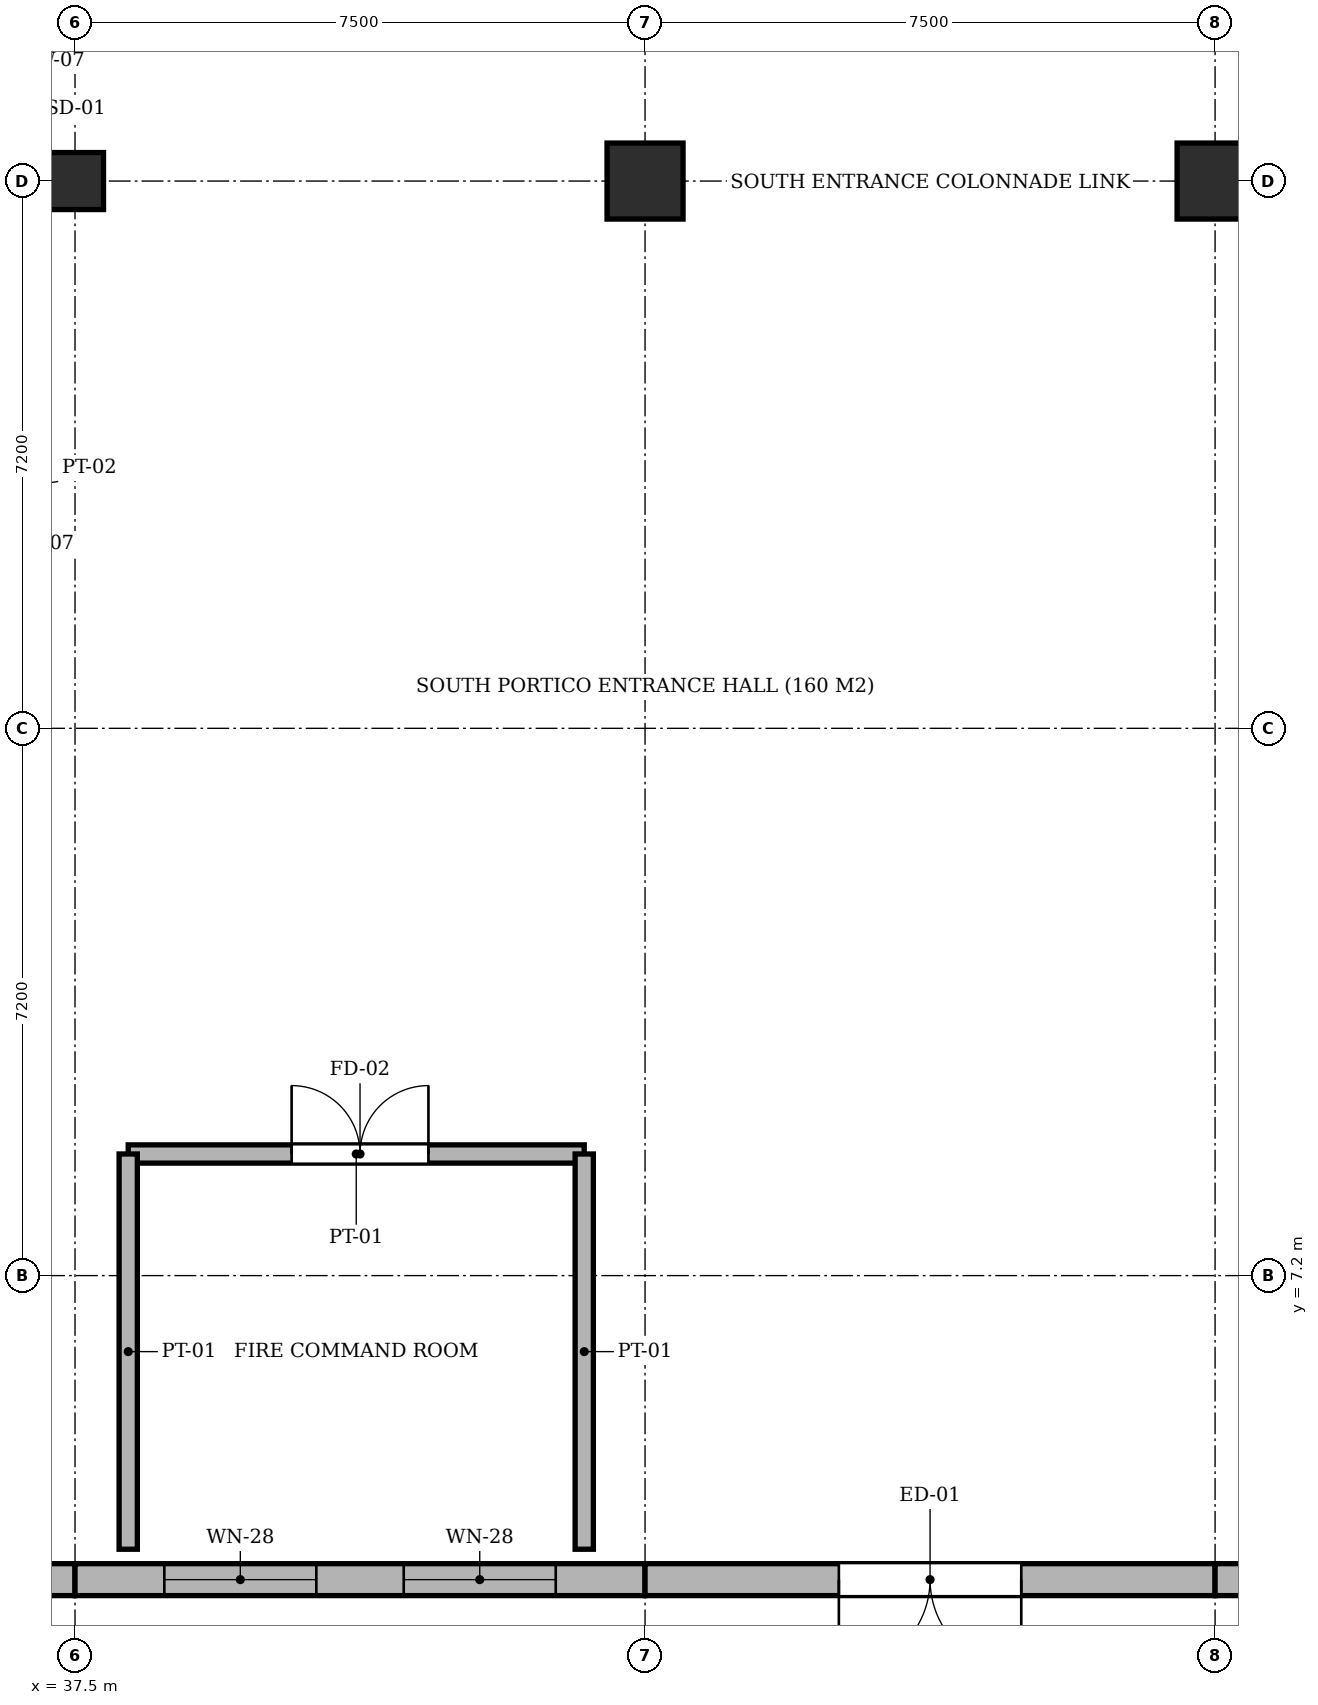
"""IFC4 building model, lengths in metres.
Left out: names, types, materials, properties, quantities, classifications, styles, units other than length and angle.
Written with IfcOpenShell. Run it as: python <this file> out.ifc"""

import sys

from ifc_helpers import new_model, si_unit, direction, frame, frame_2d, origin, origin_2d, place, context, subcontext, project, spatial, rectangle, extrude, element, fill, save


model = new_model("IFC4")
c1 = context("Model", 3, precision=1e-05, world=origin(), true_north=direction((0.0, 1.0)))
c2 = subcontext(c1, "Body", "Model", "MODEL_VIEW")
j1 = project(units=[si_unit("LENGTHUNIT", "METRE"), si_unit("PLANEANGLEUNIT", "RADIAN")], contexts=[c1])
p1 = place(None, origin())
s1 = spatial("IfcSite", under=j1, at=p1, CompositionType="ELEMENT")
p2 = place(p1, origin())
s2 = spatial("IfcBuilding", under=s1, at=p2, CompositionType="ELEMENT")
p3 = place(p2, origin())
s3 = spatial("IfcBuildingStorey", under=s2, at=p3, CompositionType="ELEMENT", Elevation=0.0)
p4 = place(p3, frame((37.5, 21.6, -0.35), z_axis=(0.0, 0.0, 1.0), x_axis=(1.0, 0.0, 0.0)))
e1 = element("IfcColumn", 1, at=p4, inside=s3, PredefinedType="COLUMN", context=c2, shape_type="SweptSolid", body=[
    extrude(rectangle(XDim=0.75, YDim=0.75, at=origin_2d()), origin(), (0.0, 0.0, 1.0), 4.65),
])
for number, where, z_axis, x_axis in (
    (2, (45.0, 21.6, -0.35), (0.0, 0.0, 1.0), (1.0, 0.0, 0.0)),
    (3, (52.5, 21.6, -0.35), (0.0, 0.0, 1.0), (1.0, 0.0, 0.0)),
):
    element("IfcColumn", number, at=place(p3, frame(where, z_axis=z_axis, x_axis=x_axis)), inside=s3, PredefinedType="COLUMN", context=c2, shape_type="SweptSolid", body=[
        extrude(rectangle(XDim=1.0, YDim=1.0, at=origin_2d()), origin(), (0.0, 0.0, 1.0), 4.65),
    ])
p5 = place(p3, frame((30.0, 3.2, 0.0), z_axis=(0.0, 0.0, 1.0), x_axis=(1.0, 0.0, 0.0)))
e4 = element("IfcWall", 4, at=p5, inside=s3, PredefinedType="SOLIDWALL", context=c2, shape_type="SweptSolid", body=[
    extrude(rectangle(XDim=7.5, YDim=0.42, at=frame_2d((3.75, 0.0))), origin(), (0.0, 0.0, 1.0), 3.82),
])
p6 = place(p5, frame((2.55, 0.0, 0.0)))
e5 = element("IfcOpeningElement", 5, at=p6, cuts=e4, PredefinedType="OPENING", context=c2, shape_type="SweptSolid", body=[
    extrude(rectangle(XDim=2.4, YDim=2.85, at=frame_2d((1.2, 1.425))), frame((0.0, 0.222, 0.0), z_axis=(0.0, -1.0, 0.0), x_axis=(1.0, 0.0, 0.0)), (0.0, 0.0, 1.0), 0.444),
])
p7 = place(p3, frame((37.5, 3.2, 0.0), z_axis=(0.0, 0.0, 1.0), x_axis=(1.0, 0.0, 0.0)))
e6 = element("IfcWall", 6, at=p7, inside=s3, PredefinedType="SOLIDWALL", context=c2, shape_type="SweptSolid", body=[
    extrude(rectangle(XDim=7.5, YDim=0.42, at=frame_2d((3.75, 0.0))), origin(), (0.0, 0.0, 1.0), 3.82),
])
p8 = place(p7, frame((1.175, 0.0, 0.92)))
e7 = element("IfcOpeningElement", 7, at=p8, cuts=e6, PredefinedType="OPENING", context=c2, shape_type="SweptSolid", body=[
    extrude(rectangle(XDim=2.0, YDim=1.89, at=frame_2d((1.0, 0.945))), frame((0.0, 0.222, 0.0), z_axis=(0.0, -1.0, 0.0), x_axis=(1.0, 0.0, 0.0)), (0.0, 0.0, 1.0), 0.444),
])
p9 = place(p7, frame((4.325, 0.0, 0.92)))
e8 = element("IfcOpeningElement", 8, at=p9, cuts=e6, PredefinedType="OPENING", context=c2, shape_type="SweptSolid", body=[
    extrude(rectangle(XDim=2.0, YDim=1.89, at=frame_2d((1.0, 0.945))), frame((0.0, 0.222, 0.0), z_axis=(0.0, -1.0, 0.0), x_axis=(1.0, 0.0, 0.0)), (0.0, 0.0, 1.0), 0.444),
])
p10 = place(p3, frame((45.0, 3.2, 0.0), z_axis=(0.0, 0.0, 1.0), x_axis=(1.0, 0.0, 0.0)))
e9 = element("IfcWall", 9, at=p10, inside=s3, PredefinedType="SOLIDWALL", context=c2, shape_type="SweptSolid", body=[
    extrude(rectangle(XDim=7.5, YDim=0.42, at=frame_2d((3.75, 0.0))), origin(), (0.0, 0.0, 1.0), 3.82),
])
p11 = place(p10, frame((2.55, 0.0, 0.0)))
e10 = element("IfcOpeningElement", 10, at=p11, cuts=e9, PredefinedType="OPENING", context=c2, shape_type="SweptSolid", body=[
    extrude(rectangle(XDim=2.4, YDim=2.85, at=frame_2d((1.2, 1.425))), frame((0.0, 0.222, 0.0), z_axis=(0.0, -1.0, 0.0), x_axis=(1.0, 0.0, 0.0)), (0.0, 0.0, 1.0), 0.444),
])
p12 = place(p3, frame((52.5, 3.2, 0.0), z_axis=(0.0, 0.0, 1.0), x_axis=(1.0, 0.0, 0.0)))
e11 = element("IfcWall", 11, at=p12, inside=s3, PredefinedType="SOLIDWALL", context=c2, shape_type="SweptSolid", body=[
    extrude(rectangle(XDim=7.5, YDim=0.42, at=frame_2d((3.75, 0.0))), origin(), (0.0, 0.0, 1.0), 3.82),
])
p13 = place(p12, frame((1.175, 0.0, 0.92)))
e12 = element("IfcOpeningElement", 12, at=p13, cuts=e11, PredefinedType="OPENING", context=c2, shape_type="SweptSolid", body=[
    extrude(rectangle(XDim=2.0, YDim=1.89, at=frame_2d((1.0, 0.945))), frame((0.0, 0.222, 0.0), z_axis=(0.0, -1.0, 0.0), x_axis=(1.0, 0.0, 0.0)), (0.0, 0.0, 1.0), 0.444),
])
p14 = place(p12, frame((4.325, 0.0, 0.92)))
e13 = element("IfcOpeningElement", 13, at=p14, cuts=e11, PredefinedType="OPENING", context=c2, shape_type="SweptSolid", body=[
    extrude(rectangle(XDim=2.0, YDim=1.89, at=frame_2d((1.0, 0.945))), frame((0.0, 0.222, 0.0), z_axis=(0.0, -1.0, 0.0), x_axis=(1.0, 0.0, 0.0)), (0.0, 0.0, 1.0), 0.444),
])
p15 = place(p3, frame((38.2, 8.8, 0.0), z_axis=(0.0, 0.0, 1.0), x_axis=(1.0, 0.0, 0.0)))
e14 = element("IfcWall", 14, at=p15, inside=s3, PredefinedType="PARTITIONING", context=c2, shape_type="SweptSolid", body=[
    extrude(rectangle(XDim=6.0, YDim=0.24, at=frame_2d((3.0, 0.0))), origin(), (0.0, 0.0, 1.0), 3.88),
])
p16 = place(p15, frame((2.15, 0.0, 0.0)))
e15 = element("IfcOpeningElement", 15, at=p16, cuts=e14, PredefinedType="OPENING", context=c2, shape_type="SweptSolid", body=[
    extrude(rectangle(XDim=1.8, YDim=2.2, at=frame_2d((0.9, 1.1))), frame((0.0, 0.132, 0.0), z_axis=(0.0, -1.0, 0.0), x_axis=(1.0, 0.0, 0.0)), (0.0, 0.0, 1.0), 0.264),
])
for number, where, z_axis, x_axis in (
    (16, (38.2, 3.6, 0.0), (0.0, 0.0, 1.0), (0.0, 1.0, 0.0)),
    (17, (44.2, 3.6, 0.0), (0.0, 0.0, 1.0), (0.0, 1.0, 0.0)),
):
    element("IfcWall", number, at=place(p3, frame(where, z_axis=z_axis, x_axis=x_axis)), inside=s3, PredefinedType="PARTITIONING", context=c2, shape_type="SweptSolid", body=[
        extrude(rectangle(XDim=5.2, YDim=0.24, at=frame_2d((2.6, 0.0))), origin(), (0.0, 0.0, 1.0), 3.88),
    ])
p17 = place(p8, origin())
e18 = element("IfcWindow", 18, at=p17, inside=s3, PartitioningType="SINGLE_PANEL", PredefinedType="WINDOW", context=c2, shape_type="SweptSolid", body=[
    extrude(rectangle(XDim=2.0, YDim=1.89, at=frame_2d((1.0, 0.945))), frame((0.0, 0.03, 0.0), z_axis=(0.0, -1.0, 0.0), x_axis=(1.0, 0.0, 0.0)), (0.0, 0.0, 1.0), 0.06),
])
fill(e7, e18)
p18 = place(p9, origin())
e19 = element("IfcWindow", 19, at=p18, inside=s3, PartitioningType="SINGLE_PANEL", PredefinedType="WINDOW", context=c2, shape_type="SweptSolid", body=[
    extrude(rectangle(XDim=2.0, YDim=1.89, at=frame_2d((1.0, 0.945))), frame((0.0, 0.03, 0.0), z_axis=(0.0, -1.0, 0.0), x_axis=(1.0, 0.0, 0.0)), (0.0, 0.0, 1.0), 0.06),
])
fill(e8, e19)
p19 = place(p11, frame((2.4, 0.0, 0.0), z_axis=(0.0, 0.0, 1.0), x_axis=(-1.0, 0.0, 0.0)))
e20 = element("IfcDoor", 20, at=p19, inside=s3, OperationType="DOUBLE_DOOR_SINGLE_SWING", PredefinedType="DOOR", context=c2, shape_type="SweptSolid", body=[
    extrude(rectangle(XDim=2.4, YDim=2.85, at=frame_2d((1.2, 1.425))), frame((0.0, 0.025, 0.0), z_axis=(0.0, -1.0, 0.0), x_axis=(1.0, 0.0, 0.0)), (0.0, 0.0, 1.0), 0.05),
])
fill(e10, e20)
p20 = place(p16, origin())
e21 = element("IfcDoor", 21, at=p20, inside=s3, OperationType="DOUBLE_DOOR_SINGLE_SWING", PredefinedType="DOOR", context=c2, shape_type="SweptSolid", body=[
    extrude(rectangle(XDim=1.8, YDim=2.2, at=frame_2d((0.9, 1.1))), frame((0.0, 0.025, 0.0), z_axis=(0.0, -1.0, 0.0), x_axis=(1.0, 0.0, 0.0)), (0.0, 0.0, 1.0), 0.05),
])
fill(e15, e21)
save(model, sys.argv[1])
